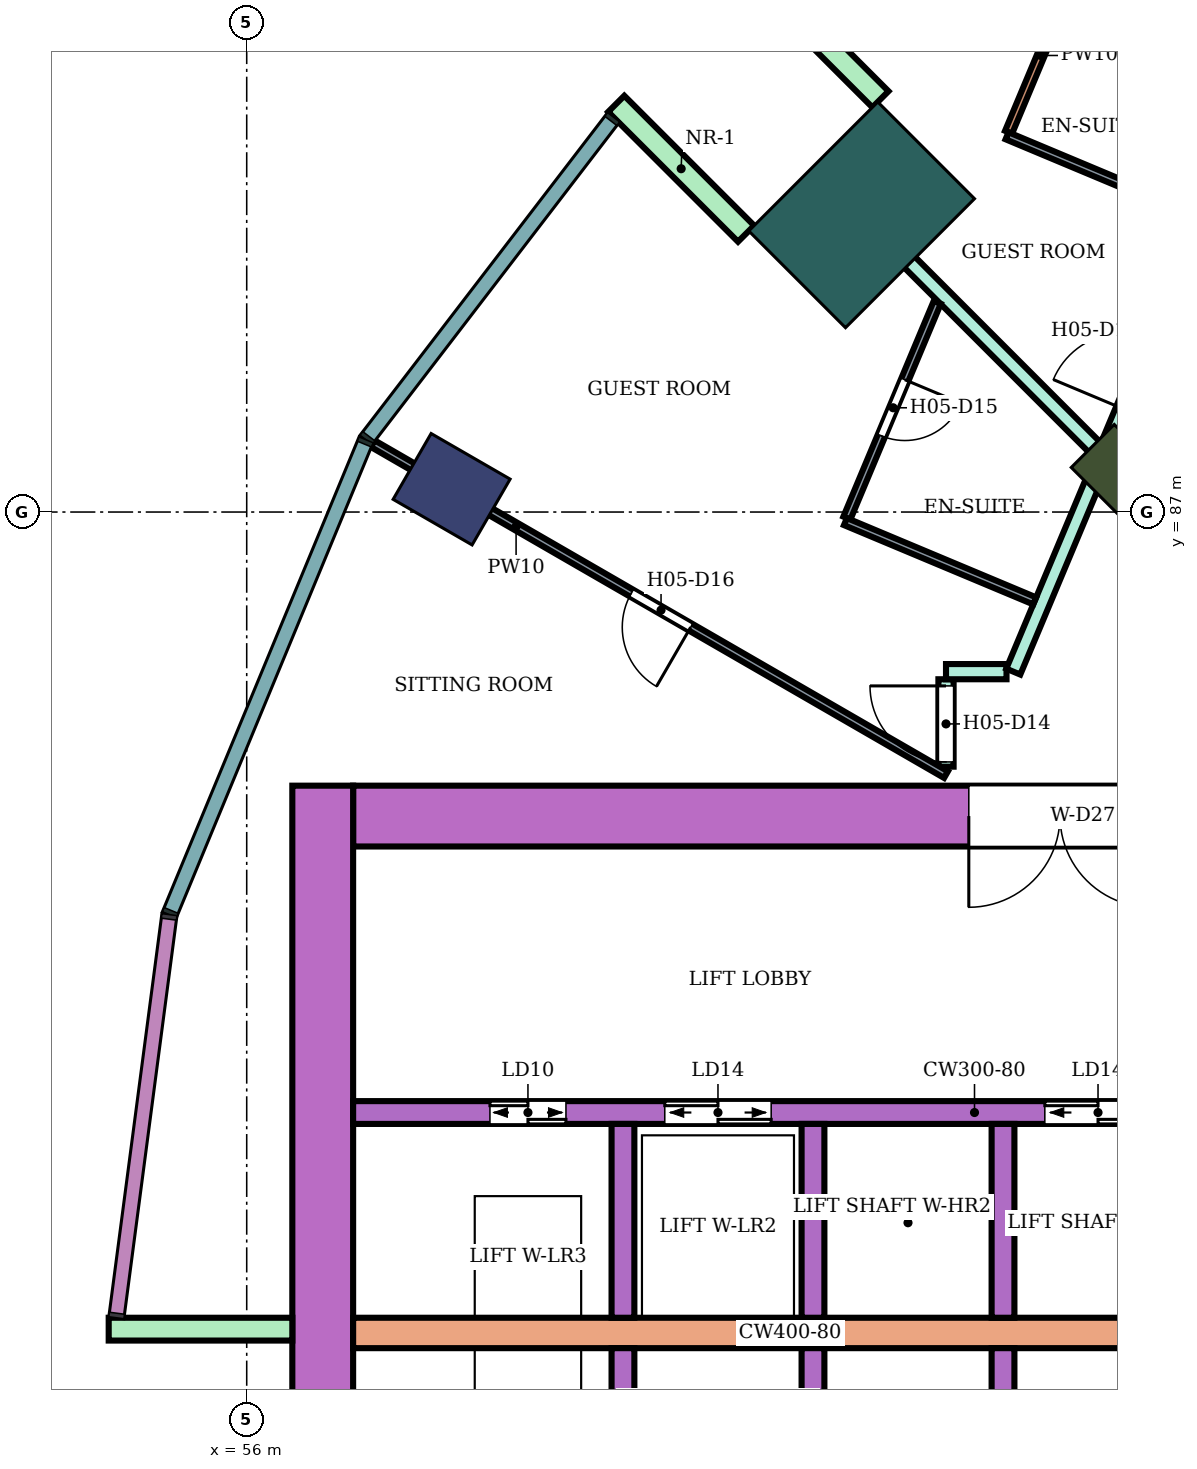
"""IFC4 building model, lengths in metres.
Left out: names, types, materials, properties, quantities, classifications, styles, units other than length and angle.
Written with IfcOpenShell. Run it as: python <this file> out.ifc"""

import sys

from ifc_helpers import new_model, si_unit, direction, frame, frame_2d, origin, origin_2d, place, context, subcontext, project, spatial, rectangle, extrude, element, fill, save


model = new_model("IFC4")
c1 = context("Model", 3, precision=1e-05, world=origin(), true_north=direction((0.0, 1.0)))
c2 = subcontext(c1, "Body", "Model", "MODEL_VIEW")
j1 = project(units=[si_unit("LENGTHUNIT", "METRE"), si_unit("PLANEANGLEUNIT", "RADIAN")], contexts=[c1])
p1 = place(None, origin())
s1 = spatial("IfcSite", under=j1, at=p1, CompositionType="ELEMENT")
p2 = place(p1, origin())
s2 = spatial("IfcBuilding", under=s1, at=p2, CompositionType="ELEMENT")
p3 = place(p2, frame((0.0, 0.0, 82.4)))
s3 = spatial("IfcBuildingStorey", under=s2, at=p3, CompositionType="ELEMENT", Elevation=82.4)
p4 = place(p3, frame((58.696, 87.3, 0.0), z_axis=(0.0, 0.0, 1.0), x_axis=(-0.866025403784, 0.5, 0.0)))
e1 = element("IfcColumn", 1, at=p4, inside=s3, PredefinedType="COLUMN", context=c2, shape_type="SweptSolid", body=[
    extrude(rectangle(XDim=1.2, YDim=1.0, at=origin_2d()), origin(), (0.0, 0.0, 1.0), 3.8),
])
p5 = place(p3, frame((67.555, 87.445, 0.0), z_axis=(0.0, 0.0, 1.0), x_axis=(-0.707106781187, 0.707106781187, 0.0)))
e2 = element("IfcColumn", 2, at=p5, inside=s3, PredefinedType="COLUMN", context=c2, shape_type="SweptSolid", body=[
    extrude(rectangle(XDim=1.2, YDim=0.8, at=origin_2d()), origin(), (0.0, 0.0, 1.0), 3.8),
])
p6 = place(p3, frame((64.09, 90.91, 0.0), z_axis=(0.0, 0.0, 1.0), x_axis=(-0.707106781187, 0.707106781187, 0.0)))
e3 = element("IfcColumn", 3, at=p6, inside=s3, PredefinedType="COLUMN", context=c2, shape_type="SweptSolid", body=[
    extrude(rectangle(XDim=1.8, YDim=2.4, at=origin_2d()), origin(), (0.0, 0.0, 1.0), 3.8),
])
p7 = place(p3, frame((72.1, 83.0, 0.0), z_axis=(0.0, 0.0, 1.0), x_axis=(-1.0, 0.0, 0.0)))
e4 = element("IfcWall", 4, at=p7, inside=s3, PredefinedType="SHEAR", context=c2, shape_type="SweptSolid", body=[
    extrude(rectangle(XDim=14.7, YDim=0.8, at=frame_2d((7.35, 0.0))), origin(), (0.0, 0.0, 1.0), 3.48),
])
p8 = place(p7, frame((4.2, 0.0, 0.0)))
e5 = element("IfcOpeningElement", 5, at=p8, cuts=e4, PredefinedType="OPENING", context=c2, shape_type="SweptSolid", body=[
    extrude(rectangle(XDim=2.4, YDim=2.4, at=frame_2d((1.2, 1.2))), frame((0.0, 0.41, 0.0), z_axis=(0.0, -1.0, 0.0), x_axis=(1.0, 0.0, 0.0)), (0.0, 0.0, 1.0), 0.82),
])
p9 = place(p3, frame((57.0, 83.4, 0.0), z_axis=(0.0, 0.0, 1.0), x_axis=(0.0, -1.0, 0.0)))
e6 = element("IfcWall", 6, at=p9, inside=s3, PredefinedType="SHEAR", context=c2, shape_type="SweptSolid", body=[
    extrude(rectangle(XDim=16.8, YDim=0.8, at=frame_2d((8.4, 0.0))), origin(), (0.0, 0.0, 1.0), 3.48),
])
p10 = place(p3, frame((68.3, 76.2, 0.0), z_axis=(0.0, 0.0, 1.0), x_axis=(-1.0, 0.0, 0.0)))
e7 = element("IfcWall", 7, at=p10, inside=s3, PredefinedType="SHEAR", context=c2, shape_type="SweptSolid", body=[
    extrude(rectangle(XDim=10.9, YDim=0.4, at=frame_2d((5.45, 0.0))), origin(), (0.0, 0.0, 1.0), 3.48),
])
p11 = place(p3, frame((68.3, 79.1, 0.0), z_axis=(0.0, 0.0, 1.0), x_axis=(-1.0, 0.0, 0.0)))
e8 = element("IfcWall", 8, at=p11, inside=s3, PredefinedType="SHEAR", context=c2, shape_type="SweptSolid", body=[
    extrude(rectangle(XDim=10.9, YDim=0.3, at=frame_2d((5.45, 0.0))), origin(), (0.0, 0.0, 1.0), 3.48),
])
p12 = place(p11, frame((0.4, 0.0, 0.0)))
e9 = element("IfcOpeningElement", 9, at=p12, cuts=e8, PredefinedType="OPENING", context=c2, shape_type="SweptSolid", body=[
    extrude(rectangle(XDim=1.4, YDim=2.1, at=frame_2d((0.7, 1.05))), frame((0.0, 0.16, 0.0), z_axis=(0.0, -1.0, 0.0), x_axis=(1.0, 0.0, 0.0)), (0.0, 0.0, 1.0), 0.32),
])
p13 = place(p11, frame((5.4, 0.0, 0.0)))
e10 = element("IfcOpeningElement", 10, at=p13, cuts=e8, PredefinedType="OPENING", context=c2, shape_type="SweptSolid", body=[
    extrude(rectangle(XDim=1.4, YDim=2.1, at=frame_2d((0.7, 1.05))), frame((0.0, 0.16, 0.0), z_axis=(0.0, -1.0, 0.0), x_axis=(1.0, 0.0, 0.0)), (0.0, 0.0, 1.0), 0.32),
])
p14 = place(p11, frame((8.1, 0.0, 0.0)))
e11 = element("IfcOpeningElement", 11, at=p14, cuts=e8, PredefinedType="OPENING", context=c2, shape_type="SweptSolid", body=[
    extrude(rectangle(XDim=1.0, YDim=2.1, at=frame_2d((0.5, 1.05))), frame((0.0, 0.16, 0.0), z_axis=(0.0, -1.0, 0.0), x_axis=(1.0, 0.0, 0.0)), (0.0, 0.0, 1.0), 0.32),
])
for number, where, z_axis, x_axis in (
    (12, (65.95, 76.0, 0.0), (0.0, 0.0, 1.0), (0.0, -1.0, 0.0)),
    (13, (63.45, 76.0, 0.0), (0.0, 0.0, 1.0), (0.0, -1.0, 0.0)),
    (14, (60.95, 76.0, 0.0), (0.0, 0.0, 1.0), (0.0, -1.0, 0.0)),
    (15, (65.95, 78.95, 0.0), (0.0, 0.0, 1.0), (0.0, -1.0, 0.0)),
    (16, (63.45, 78.95, 0.0), (0.0, 0.0, 1.0), (0.0, -1.0, 0.0)),
    (17, (60.95, 78.95, 0.0), (0.0, 0.0, 1.0), (0.0, -1.0, 0.0)),
):
    element("IfcWall", number, at=place(p3, frame(where, z_axis=z_axis, x_axis=x_axis)), inside=s3, PredefinedType="SHEAR", context=c2, shape_type="SweptSolid", body=[
        extrude(rectangle(XDim=2.55, YDim=0.3, at=frame_2d((1.275, 0.0))), origin(), (0.0, 0.0, 1.0), 3.48),
    ])
for number, where, z_axis, x_axis in (
    (18, (64.338, 92.43, 0.0), (0.0, 0.0, 1.0), (-0.707, 0.707, 0.0)),
    (19, (62.57, 90.662, 0.0), (0.0, 0.0, 1.0), (-0.707, 0.707, 0.0)),
    (20, (56.6, 76.25, 0.0), (0.0, 0.0, 1.0), (-1.0, 0.0, 0.0)),
):
    element("IfcWall", number, at=place(p3, frame(where, z_axis=z_axis, x_axis=x_axis)), inside=s3, PredefinedType="NOTDEFINED", context=c2, shape_type="SweptSolid", body=[
        extrude(rectangle(XDim=2.416, YDim=0.3, at=frame_2d((1.208, 0.0))), origin(), (0.0, 0.0, 1.0), 3.8),
    ])
p15 = place(p3, frame((63.6, 91.409, 0.0), z_axis=(0.0, 0.0, 1.0), x_axis=(0.70693749829, -0.707276023566, 0.0)))
e21 = element("IfcWall", 21, at=p15, inside=s3, PredefinedType="PARTITIONING", context=c2, shape_type="SweptSolid", body=[
    extrude(rectangle(XDim=5.048, YDim=0.2, at=frame_2d((2.524, 0.0))), origin(), (0.0, 0.0, 1.0), 3.35),
])
p16 = place(p3, frame((65.2, 83.65, 0.0), z_axis=(0.0, 0.0, 1.0), x_axis=(0.0, 1.0, 0.0)))
e22 = element("IfcWall", 22, at=p16, inside=s3, PredefinedType="PARTITIONING", context=c2, shape_type="SweptSolid", body=[
    extrude(rectangle(XDim=1.15, YDim=0.2, at=frame_2d((0.575, 0.0))), origin(), (0.0, 0.0, 1.0), 3.35),
])
p17 = place(p16, frame((0.062, 0.0, 0.0)))
e23 = element("IfcOpeningElement", 23, at=p17, cuts=e22, PredefinedType="OPENING", context=c2, shape_type="SweptSolid", body=[
    extrude(rectangle(XDim=1.0, YDim=2.1, at=frame_2d((0.5, 1.05))), frame((0.0, 0.11, 0.0), z_axis=(0.0, -1.0, 0.0), x_axis=(1.0, 0.0, 0.0)), (0.0, 0.0, 1.0), 0.22),
])
p18 = place(p3, frame((65.2, 84.9, 0.0), z_axis=(0.0, 0.0, 1.0), x_axis=(1.0, 0.0, 0.0)))
e24 = element("IfcWall", 24, at=p18, inside=s3, PredefinedType="PARTITIONING", context=c2, shape_type="SweptSolid", body=[
    extrude(rectangle(XDim=0.796, YDim=0.2, at=frame_2d((0.398, 0.0))), origin(), (0.0, 0.0, 1.0), 3.35),
])
p19 = place(p3, frame((66.085, 84.9, 0.0), z_axis=(0.0, 0.0, 1.0), x_axis=(0.386676248006, 0.922215527536, 0.0)))
e25 = element("IfcWall", 25, at=p19, inside=s3, PredefinedType="PARTITIONING", context=c2, shape_type="SweptSolid", body=[
    extrude(rectangle(XDim=8.5, YDim=0.2, at=frame_2d((4.25, 0.0))), origin(), (0.0, 0.0, 1.0), 3.35),
])
p20 = place(p19, frame((3.748, 0.0, 0.0)))
e26 = element("IfcOpeningElement", 26, at=p20, cuts=e25, PredefinedType="OPENING", context=c2, shape_type="SweptSolid", body=[
    extrude(rectangle(XDim=1.0, YDim=2.1, at=frame_2d((0.5, 1.05))), frame((0.0, 0.11, 0.0), z_axis=(0.0, -1.0, 0.0), x_axis=(1.0, 0.0, 0.0)), (0.0, 0.0, 1.0), 0.22),
])
p21 = place(p3, frame((67.104, 97.343, 0.0), z_axis=(0.0, 0.0, 1.0), x_axis=(0.499799615385, -0.866141064989, 0.0)))
e27 = element("IfcWall", 27, at=p21, inside=s3, PredefinedType="PARTITIONING", context=c2, shape_type="SweptSolid", body=[
    extrude(rectangle(XDim=5.021, YDim=0.2, at=frame_2d((2.511, 0.0))), origin(), (0.0, 0.0, 1.0), 3.35),
])
p22 = place(p3, frame((57.659, 87.899, 0.0), z_axis=(0.0, 0.0, 1.0), x_axis=(0.86602264145, -0.500004784474, 0.0)))
e28 = element("IfcWall", 28, at=p22, inside=s3, PredefinedType="PARTITIONING", context=c2, shape_type="SweptSolid", body=[
    extrude(rectangle(XDim=8.708, YDim=0.1, at=frame_2d((4.354, 0.0))), origin(), (0.0, 0.0, 1.0), 3.35),
])
p23 = place(p22, frame((3.929, 0.0, 0.0)))
e29 = element("IfcOpeningElement", 29, at=p23, cuts=e28, PredefinedType="OPENING", context=c2, shape_type="SweptSolid", body=[
    extrude(rectangle(XDim=0.9, YDim=2.1, at=frame_2d((0.45, 1.05))), frame((0.0, 0.06, 0.0), z_axis=(0.0, -1.0, 0.0), x_axis=(1.0, 0.0, 0.0)), (0.0, 0.0, 1.0), 0.12),
])
p24 = place(p3, frame((63.896, 86.92, 0.0), z_axis=(0.0, 0.0, 1.0), x_axis=(0.386485049699, 0.922295671875, 0.0)))
e30 = element("IfcWall", 30, at=p24, inside=s3, PredefinedType="PARTITIONING", context=c2, shape_type="SweptSolid", body=[
    extrude(rectangle(XDim=3.077, YDim=0.1, at=frame_2d((1.539, 0.0))), origin(), (0.0, 0.0, 1.0), 3.35),
])
p25 = place(p24, frame((1.174, 0.0, 0.0)))
e31 = element("IfcOpeningElement", 31, at=p25, cuts=e30, PredefinedType="OPENING", context=c2, shape_type="SweptSolid", body=[
    extrude(rectangle(XDim=0.8, YDim=2.1, at=frame_2d((0.4, 1.05))), frame((0.0, 0.06, 0.0), z_axis=(0.0, -1.0, 0.0), x_axis=(1.0, 0.0, 0.0)), (0.0, 0.0, 1.0), 0.12),
])
p26 = place(p3, frame((63.877, 86.874, 0.0), z_axis=(0.0, 0.0, 1.0), x_axis=(0.922350337209, -0.386354572188, 0.0)))
e32 = element("IfcWall", 32, at=p26, inside=s3, PredefinedType="PARTITIONING", context=c2, shape_type="SweptSolid", body=[
    extrude(rectangle(XDim=2.7, YDim=0.1, at=frame_2d((1.35, 0.0))), origin(), (0.0, 0.0, 1.0), 3.35),
])
p27 = place(p3, frame((66.023, 91.996, 0.0), z_axis=(0.0, 0.0, 1.0), x_axis=(0.386497426192, 0.922290485447, 0.0)))
e33 = element("IfcWall", 33, at=p27, inside=s3, PredefinedType="PARTITIONING", context=c2, shape_type="SweptSolid", body=[
    extrude(rectangle(XDim=4.383, YDim=0.1, at=frame_2d((2.191, 0.0))), origin(), (0.0, 0.0, 1.0), 2.58),
])
p28 = place(p27, frame((1.841, 0.0, 0.0)))
e34 = element("IfcOpeningElement", 34, at=p28, cuts=e33, PredefinedType="OPENING", context=c2, shape_type="SweptSolid", body=[
    extrude(rectangle(XDim=0.8, YDim=2.1, at=frame_2d((0.4, 1.05))), frame((0.0, 0.06, 0.0), z_axis=(0.0, -1.0, 0.0), x_axis=(1.0, 0.0, 0.0)), (0.0, 0.0, 1.0), 0.12),
])
p29 = place(p3, frame((66.003, 91.95, 0.0), z_axis=(0.0, 0.0, 1.0), x_axis=(0.922350337209, -0.386354572188, 0.0)))
e35 = element("IfcWall", 35, at=p29, inside=s3, PredefinedType="PARTITIONING", context=c2, shape_type="SweptSolid", body=[
    extrude(rectangle(XDim=2.7, YDim=0.1, at=frame_2d((1.35, 0.0))), origin(), (0.0, 0.0, 1.0), 3.35),
])
p30 = place(p17, origin())
e36 = element("IfcDoor", 36, at=p30, inside=s3, OperationType="SINGLE_SWING_RIGHT", PredefinedType="DOOR", context=c2, shape_type="SweptSolid", body=[
    extrude(rectangle(XDim=1.0, YDim=2.1, at=frame_2d((0.5, 1.05))), frame((0.0, 0.025, 0.0), z_axis=(0.0, -1.0, 0.0), x_axis=(1.0, 0.0, 0.0)), (0.0, 0.0, 1.0), 0.05),
])
fill(e23, e36)
p31 = place(p25, frame((0.8, 0.0, 0.0), z_axis=(0.0, 0.0, 1.0), x_axis=(-1.0, 0.0, 0.0)))
e37 = element("IfcDoor", 37, at=p31, inside=s3, OperationType="SINGLE_SWING_LEFT", PredefinedType="DOOR", context=c2, shape_type="SweptSolid", body=[
    extrude(rectangle(XDim=0.8, YDim=2.1, at=frame_2d((0.4, 1.05))), frame((0.0, 0.025, 0.0), z_axis=(0.0, -1.0, 0.0), x_axis=(1.0, 0.0, 0.0)), (0.0, 0.0, 1.0), 0.05),
])
fill(e31, e37)
p32 = place(p23, frame((0.9, 0.0, 0.0), z_axis=(0.0, 0.0, 1.0), x_axis=(-1.0, 0.0, 0.0)))
e38 = element("IfcDoor", 38, at=p32, inside=s3, OperationType="SINGLE_SWING_LEFT", PredefinedType="DOOR", context=c2, shape_type="SweptSolid", body=[
    extrude(rectangle(XDim=0.9, YDim=2.1, at=frame_2d((0.45, 1.05))), frame((0.0, 0.025, 0.0), z_axis=(0.0, -1.0, 0.0), x_axis=(1.0, 0.0, 0.0)), (0.0, 0.0, 1.0), 0.05),
])
fill(e29, e38)
p33 = place(p12, origin())
e39 = element("IfcDoor", 39, at=p33, inside=s3, OperationType="DOUBLE_DOOR_SLIDING", PredefinedType="DOOR", context=c2, shape_type="SweptSolid", body=[
    extrude(rectangle(XDim=1.4, YDim=2.1, at=frame_2d((0.7, 1.05))), frame((0.0, 0.025, 0.0), z_axis=(0.0, -1.0, 0.0), x_axis=(1.0, 0.0, 0.0)), (0.0, 0.0, 1.0), 0.05),
])
fill(e9, e39)
p34 = place(p13, origin())
e40 = element("IfcDoor", 40, at=p34, inside=s3, OperationType="DOUBLE_DOOR_SLIDING", PredefinedType="DOOR", context=c2, shape_type="SweptSolid", body=[
    extrude(rectangle(XDim=1.4, YDim=2.1, at=frame_2d((0.7, 1.05))), frame((0.0, 0.025, 0.0), z_axis=(0.0, -1.0, 0.0), x_axis=(1.0, 0.0, 0.0)), (0.0, 0.0, 1.0), 0.05),
])
fill(e10, e40)
p35 = place(p14, origin())
e41 = element("IfcDoor", 41, at=p35, inside=s3, OperationType="DOUBLE_DOOR_SLIDING", PredefinedType="DOOR", context=c2, shape_type="SweptSolid", body=[
    extrude(rectangle(XDim=1.0, YDim=2.1, at=frame_2d((0.5, 1.05))), frame((0.0, 0.025, 0.0), z_axis=(0.0, -1.0, 0.0), x_axis=(1.0, 0.0, 0.0)), (0.0, 0.0, 1.0), 0.05),
])
fill(e11, e41)
p36 = place(p8, origin())
e42 = element("IfcDoor", 42, at=p36, inside=s3, OperationType="DOUBLE_DOOR_SINGLE_SWING", PredefinedType="DOOR", context=c2, shape_type="SweptSolid", body=[
    extrude(rectangle(XDim=2.4, YDim=2.4, at=frame_2d((1.2, 1.2))), frame((0.0, 0.025, 0.0), z_axis=(0.0, -1.0, 0.0), x_axis=(1.0, 0.0, 0.0)), (0.0, 0.0, 1.0), 0.05),
])
fill(e5, e42)
save(model, sys.argv[1])
